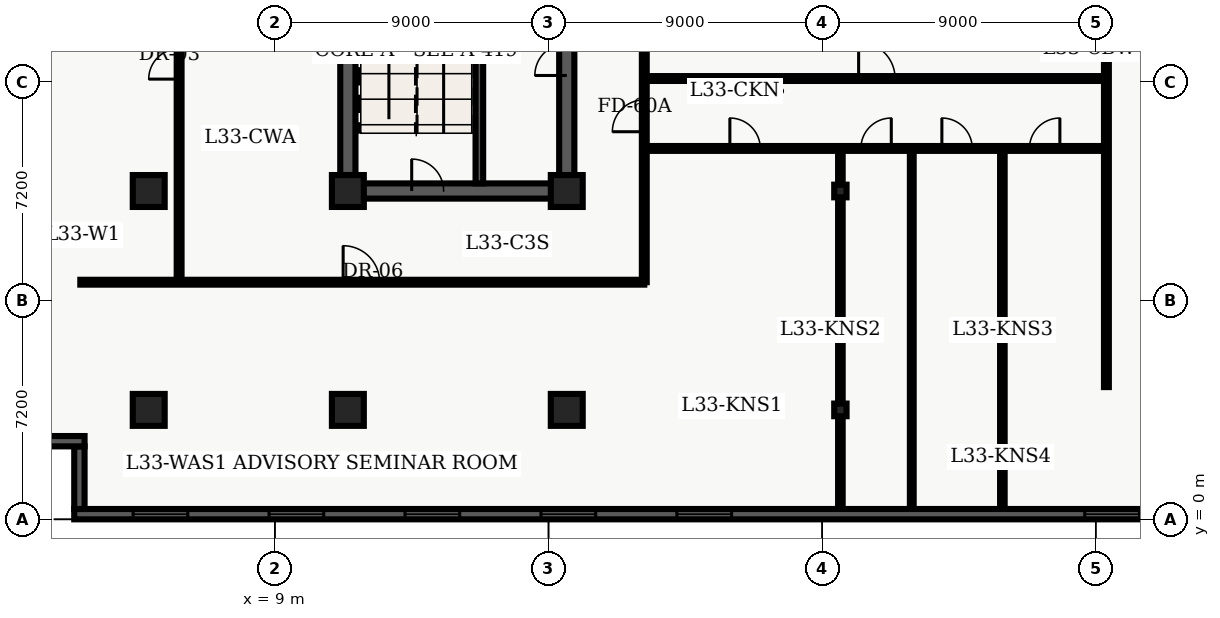
"""IFC4 building model, lengths in metres.
Left out: names, types, materials, properties, quantities, classifications, styles, units other than length and angle.
Written with IfcOpenShell. Run it as: python <this file> out.ifc"""

import sys

from ifc_helpers import new_model, entity, si_unit, converted_unit, direction, frame, origin_with_axes, origin_2d_with_axis, place, context, subcontext, project, spatial, polyline, rectangle, i_section, outline, extrude, element, fill, save


model = new_model("IFC4")
c1 = context("Model", 3, precision=1e-05, world=origin_with_axes(), true_north=direction((0.0, 1.0)))
c2 = subcontext(c1, "Body", "Model", "MODEL_VIEW")
j1 = project(units=[si_unit("LENGTHUNIT", "METRE"), converted_unit("PLANEANGLEUNIT", "DEGREE", entity("IfcPlaneAngleMeasure", 0.017), si_unit("PLANEANGLEUNIT", "RADIAN"), dimensions=[0, 0, 0, 0, 0, 0, 0])], contexts=[c1])
p1 = place(None, origin_with_axes())
s1 = spatial("IfcSite", under=j1, at=p1, CompositionType="ELEMENT")
p2 = place(p1, origin_with_axes())
s2 = spatial("IfcBuilding", under=s1, at=p2, CompositionType="ELEMENT")
p3 = place(p2, frame((0.0, 0.0, 136.8), z_axis=(0.0, 0.0, 1.0), x_axis=(1.0, 0.0, 0.0)))
s3 = spatial("IfcBuildingStorey", under=s2, at=p3, CompositionType="ELEMENT", Elevation=136.8)
p4 = place(p3, frame((11.4, 10.8, 0.0), z_axis=(0.0, 0.0, 1.0), x_axis=(0.0, 1.0, 0.0)))
e1 = element("IfcWall", 1, at=p4, inside=s3, PredefinedType="SHEAR", context=c2, shape_type="SweptSolid", body=[
    extrude(outline(polyline([(0.0, -0.25), (27.0, -0.25), (27.0, 0.25), (0.0, 0.25), (0.0, -0.25)])), origin_with_axes(), (0.0, 0.0, 1.0), 3.66),
])
p5 = place(p3, frame((11.4, 10.8, 0.0), z_axis=(0.0, 0.0, 1.0), x_axis=(1.0, 0.0, 0.0)))
e2 = element("IfcWall", 2, at=p5, inside=s3, PredefinedType="SHEAR", context=c2, shape_type="SweptSolid", body=[
    extrude(outline(polyline([(0.0, -0.25), (7.2, -0.25), (7.2, 0.25), (0.0, 0.25), (0.0, -0.25)])), origin_with_axes(), (0.0, 0.0, 1.0), 3.66),
])
p6 = place(p5, frame((2.625, 0.0, 0.0), z_axis=(0.0, 0.0, 1.0), x_axis=(1.0, 0.0, 0.0)))
e3 = element("IfcOpeningElement", 3, at=p6, cuts=e2, PredefinedType="OPENING", context=c2, shape_type="SweptSolid", body=[
    extrude(rectangle(XDim=1.05, YDim=0.52, at=origin_2d_with_axis()), origin_with_axes(), (0.0, 0.0, 1.0), 2.15),
])
p7 = place(p3, frame((18.6, 10.8, 0.0), z_axis=(0.0, 0.0, 1.0), x_axis=(0.0, 1.0, 0.0)))
e4 = element("IfcWall", 4, at=p7, inside=s3, PredefinedType="SHEAR", context=c2, shape_type="SweptSolid", body=[
    extrude(outline(polyline([(0.0, -0.25), (13.5, -0.25), (13.5, 0.25), (0.0, 0.25), (0.0, -0.25)])), origin_with_axes(), (0.0, 0.0, 1.0), 3.66),
])
p8 = place(p7, frame((11.125, 0.0, 0.0), z_axis=(0.0, 0.0, 1.0), x_axis=(1.0, 0.0, 0.0)))
e5 = element("IfcOpeningElement", 5, at=p8, cuts=e4, PredefinedType="OPENING", context=c2, shape_type="SweptSolid", body=[
    extrude(rectangle(XDim=1.05, YDim=0.52, at=origin_2d_with_axis()), origin_with_axes(), (0.0, 0.0, 1.0), 2.15),
])
p9 = place(p7, frame((4.325, 0.0, 0.0), z_axis=(0.0, 0.0, 1.0), x_axis=(1.0, 0.0, 0.0)))
e6 = element("IfcOpeningElement", 6, at=p9, cuts=e4, PredefinedType="OPENING", context=c2, shape_type="SweptSolid", body=[
    extrude(rectangle(XDim=1.05, YDim=0.52, at=origin_2d_with_axis()), origin_with_axes(), (0.0, 0.0, 1.0), 2.15),
])
p10 = place(p3, frame((15.725, 11.05, 0.0), z_axis=(0.0, 0.0, 1.0), x_axis=(0.0, 1.0, 0.0)))
e7 = element("IfcWall", 7, at=p10, inside=s3, PredefinedType="SHEAR", context=c2, shape_type="SweptSolid", body=[
    extrude(outline(polyline([(0.0, -0.125), (8.65, -0.125), (8.65, 0.125), (0.0, 0.125), (0.0, -0.125)])), origin_with_axes(), (0.0, 0.0, 1.0), 3.66),
])
for number, where, z_axis, x_axis in (
    (8, (11.4, 3.6, 0.0), (0.0, 0.0, 1.0), (1.0, 0.0, 0.0)),
    (9, (11.4, 10.8, 0.0), (0.0, 0.0, 1.0), (1.0, 0.0, 0.0)),
    (10, (18.6, 3.6, 0.0), (0.0, 0.0, 1.0), (1.0, 0.0, 0.0)),
    (11, (18.6, 10.8, 0.0), (0.0, 0.0, 1.0), (1.0, 0.0, 0.0)),
    (12, (4.85, 3.6, 0.0), (0.0, 0.0, 1.0), (1.0, 0.0, 0.0)),
    (13, (4.85, 10.8, 0.0), (0.0, 0.0, 1.0), (1.0, 0.0, 0.0)),
):
    element("IfcColumn", number, at=place(p3, frame(where, z_axis=z_axis, x_axis=x_axis)), inside=s3, PredefinedType="COLUMN", context=c2, shape_type="SweptSolid", body=[
        extrude(rectangle(XDim=1.05, YDim=1.05, at=origin_2d_with_axis()), origin_with_axes(), (0.0, 0.0, 1.0), 3.9),
    ])
for number, where, z_axis, x_axis in (
    (14, (27.6, 3.6, 0.0), (0.0, 0.0, 1.0), (1.0, 0.0, 0.0)),
    (15, (27.6, 10.8, 0.0), (0.0, 0.0, 1.0), (1.0, 0.0, 0.0)),
):
    element("IfcColumn", number, at=place(p3, frame(where, z_axis=z_axis, x_axis=x_axis)), inside=s3, PredefinedType="COLUMN", context=c2, shape_type="SweptSolid", body=[
        extrude(i_section(OverallWidth=0.406, OverallDepth=0.416, WebThickness=0.03, FlangeThickness=0.048, FilletRadius=0.022, at=origin_2d_with_axis()), origin_with_axes(), (0.0, 0.0, 1.0), 3.9),
    ])
p11 = place(p3, frame((2.6, 7.8, 0.0), z_axis=(0.0, 0.0, 1.0), x_axis=(1.0, 0.0, 0.0)))
e16 = element("IfcWall", 16, at=p11, inside=s3, PredefinedType="PARTITIONING", context=c2, shape_type="SweptSolid", body=[
    extrude(outline(polyline([(0.0, -0.08), (18.55, -0.08), (18.55, 0.08), (0.0, 0.08), (0.0, -0.08)])), origin_with_axes(), (0.0, 0.0, 1.0), 2.7),
])
p12 = place(p11, frame((9.245, 0.0, 0.0), z_axis=(0.0, 0.0, 1.0), x_axis=(1.0, 0.0, 0.0)))
e17 = element("IfcOpeningElement", 17, at=p12, cuts=e16, PredefinedType="OPENING", context=c2, shape_type="SweptSolid", body=[
    extrude(rectangle(XDim=1.2, YDim=0.18, at=origin_2d_with_axis()), origin_with_axes(), (0.0, 0.0, 1.0), 2.2),
])
p13 = place(p3, frame((21.15, 7.8, 0.0), z_axis=(0.0, 0.0, 1.0), x_axis=(0.0, 1.0, 0.0)))
e18 = element("IfcWall", 18, at=p13, inside=s3, PredefinedType="PARTITIONING", context=c2, shape_type="SweptSolid", body=[
    extrude(outline(polyline([(0.0, -0.08), (32.7, -0.08), (32.7, 0.08), (0.0, 0.08), (0.0, -0.08)])), origin_with_axes(), (0.0, 0.0, 1.0), 2.7),
])
p14 = place(p13, frame((5.475, 0.0, 0.0), z_axis=(0.0, 0.0, 1.0), x_axis=(1.0, 0.0, 0.0)))
e19 = element("IfcOpeningElement", 19, at=p14, cuts=e18, PredefinedType="OPENING", context=c2, shape_type="SweptSolid", body=[
    extrude(rectangle(XDim=1.05, YDim=0.18, at=origin_2d_with_axis()), origin_with_axes(), (0.0, 0.0, 1.0), 2.15),
])
p15 = place(p3, frame((5.85, 7.8, 0.0), z_axis=(0.0, 0.0, 1.0), x_axis=(0.0, 1.0, 0.0)))
e20 = element("IfcWall", 20, at=p15, inside=s3, PredefinedType="PARTITIONING", context=c2, shape_type="SweptSolid", body=[
    extrude(outline(polyline([(0.0, -0.08), (32.7, -0.08), (32.7, 0.08), (0.0, 0.08), (0.0, -0.08)])), origin_with_axes(), (0.0, 0.0, 1.0), 2.7),
])
p16 = place(p15, frame((7.181, 0.0, 0.0), z_axis=(0.0, 0.0, 1.0), x_axis=(1.0, 0.0, 0.0)))
e21 = element("IfcOpeningElement", 21, at=p16, cuts=e20, PredefinedType="OPENING", context=c2, shape_type="SweptSolid", body=[
    extrude(rectangle(XDim=1.0, YDim=0.18, at=origin_2d_with_axis()), origin_with_axes(), (0.0, 0.0, 1.0), 2.15),
])
p17 = place(p15, frame((23.401, 0.0, 0.0), z_axis=(0.0, 0.0, 1.0), x_axis=(1.0, 0.0, 0.0)))
e22 = element("IfcOpeningElement", 22, at=p17, cuts=e20, PredefinedType="OPENING", context=c2, shape_type="SweptSolid", body=[
    extrude(rectangle(XDim=1.0, YDim=0.18, at=origin_2d_with_axis()), origin_with_axes(), (0.0, 0.0, 1.0), 2.15),
])
p18 = place(p3, frame((21.15, 12.2, 0.0), z_axis=(0.0, 0.0, 1.0), x_axis=(1.0, 0.0, 0.0)))
e23 = element("IfcWall", 23, at=p18, inside=s3, PredefinedType="PARTITIONING", context=c2, shape_type="SweptSolid", body=[
    extrude(outline(polyline([(0.0, -0.08), (15.2, -0.08), (15.2, 0.08), (0.0, 0.08), (0.0, -0.08)])), origin_with_axes(), (0.0, 0.0, 1.0), 2.7),
])
p19 = place(p18, frame((3.315, 0.0, 0.0), z_axis=(0.0, 0.0, 1.0), x_axis=(1.0, 0.0, 0.0)))
e24 = element("IfcOpeningElement", 24, at=p19, cuts=e23, PredefinedType="OPENING", context=c2, shape_type="SweptSolid", body=[
    extrude(rectangle(XDim=1.0, YDim=0.18, at=origin_2d_with_axis()), origin_with_axes(), (0.0, 0.0, 1.0), 2.15),
])
p20 = place(p18, frame((7.624, 0.0, 0.0), z_axis=(0.0, 0.0, 1.0), x_axis=(1.0, 0.0, 0.0)))
e25 = element("IfcOpeningElement", 25, at=p20, cuts=e23, PredefinedType="OPENING", context=c2, shape_type="SweptSolid", body=[
    extrude(rectangle(XDim=1.0, YDim=0.18, at=origin_2d_with_axis()), origin_with_axes(), (0.0, 0.0, 1.0), 2.15),
])
p21 = place(p18, frame((10.288, 0.0, 0.0), z_axis=(0.0, 0.0, 1.0), x_axis=(1.0, 0.0, 0.0)))
e26 = element("IfcOpeningElement", 26, at=p21, cuts=e23, PredefinedType="OPENING", context=c2, shape_type="SweptSolid", body=[
    extrude(rectangle(XDim=1.0, YDim=0.18, at=origin_2d_with_axis()), origin_with_axes(), (0.0, 0.0, 1.0), 2.15),
])
p22 = place(p18, frame((13.169, 0.0, 0.0), z_axis=(0.0, 0.0, 1.0), x_axis=(1.0, 0.0, 0.0)))
e27 = element("IfcOpeningElement", 27, at=p22, cuts=e23, PredefinedType="OPENING", context=c2, shape_type="SweptSolid", body=[
    extrude(rectangle(XDim=1.0, YDim=0.18, at=origin_2d_with_axis()), origin_with_axes(), (0.0, 0.0, 1.0), 2.15),
])
p23 = place(p3, frame((21.15, 14.5, 0.0), z_axis=(0.0, 0.0, 1.0), x_axis=(1.0, 0.0, 0.0)))
e28 = element("IfcWall", 28, at=p23, inside=s3, PredefinedType="PARTITIONING", context=c2, shape_type="SweptSolid", body=[
    extrude(outline(polyline([(0.0, -0.08), (15.2, -0.08), (15.2, 0.08), (0.0, 0.08), (0.0, -0.08)])), origin_with_axes(), (0.0, 0.0, 1.0), 2.7),
])
p24 = place(p23, frame((7.65, 0.0, 0.0), z_axis=(0.0, 0.0, 1.0), x_axis=(1.0, 0.0, 0.0)))
e29 = element("IfcOpeningElement", 29, at=p24, cuts=e28, PredefinedType="OPENING", context=c2, shape_type="SweptSolid", body=[
    extrude(rectangle(XDim=1.2, YDim=0.18, at=origin_2d_with_axis()), origin_with_axes(), (0.0, 0.0, 1.0), 2.2),
])
p25 = place(p3, frame((36.35, 4.35, 0.0), z_axis=(0.0, 0.0, 1.0), x_axis=(0.0, 1.0, 0.0)))
e30 = element("IfcWall", 30, at=p25, inside=s3, PredefinedType="PARTITIONING", context=c2, shape_type="SweptSolid", body=[
    extrude(outline(polyline([(0.0, -0.08), (16.95, -0.08), (16.95, 0.08), (0.0, 0.08), (0.0, -0.08)])), origin_with_axes(), (0.0, 0.0, 1.0), 2.7),
])
p26 = place(p3, frame((27.6, 0.335, 0.0), z_axis=(0.0, 0.0, 1.0), x_axis=(0.0, 1.0, 0.0)))
e31 = element("IfcWall", 31, at=p26, inside=s3, PredefinedType="PARTITIONING", context=c2, shape_type="SweptSolid", body=[
    extrude(outline(polyline([(0.0, -0.075), (11.745, -0.075), (11.745, 0.075), (0.0, 0.075), (0.0, -0.075)])), origin_with_axes(), (0.0, 0.0, 1.0), 2.7),
])
p27 = place(p3, frame((29.948, 0.335, 0.0), z_axis=(0.0, 0.0, 1.0), x_axis=(0.0, 1.0, 0.0)))
e32 = element("IfcWall", 32, at=p27, inside=s3, PredefinedType="PARTITIONING", context=c2, shape_type="SweptSolid", body=[
    extrude(outline(polyline([(0.0, -0.062), (11.745, -0.062), (11.745, 0.062), (0.0, 0.062), (0.0, -0.062)])), origin_with_axes(), (0.0, 0.0, 1.0), 2.7),
])
p28 = place(p3, frame((32.928, 0.335, 0.0), z_axis=(0.0, 0.0, 1.0), x_axis=(0.0, 1.0, 0.0)))
e33 = element("IfcWall", 33, at=p28, inside=s3, PredefinedType="PARTITIONING", context=c2, shape_type="SweptSolid", body=[
    extrude(outline(polyline([(0.0, -0.075), (11.745, -0.075), (11.745, 0.075), (0.0, 0.075), (0.0, -0.075)])), origin_with_axes(), (0.0, 0.0, 1.0), 2.7),
])
p29 = place(p3, frame((57.26, 0.17, 0.0), z_axis=(0.0, 0.0, 1.0), x_axis=(-1.0, 0.0, 0.0)))
e34 = element("IfcWall", 34, at=p29, inside=s3, PredefinedType="SOLIDWALL", context=c2, shape_type="SweptSolid", body=[
    extrude(outline(polyline([(0.0, -0.17), (54.86, -0.17), (54.86, 0.17), (0.0, 0.17), (0.0, -0.17)])), origin_with_axes(), (0.0, 0.0, 1.0), 3.66),
])
p30 = place(p29, frame((2.836, 0.0, 0.45), z_axis=(0.0, 0.0, 1.0), x_axis=(1.0, 0.0, 0.0)))
e35 = element("IfcOpeningElement", 35, at=p30, cuts=e34, PredefinedType="OPENING", context=c2, shape_type="SweptSolid", body=[
    extrude(rectangle(XDim=1.8, YDim=0.36, at=origin_2d_with_axis()), origin_with_axes(), (0.0, 0.0, 1.0), 2.1),
])
p31 = place(p29, frame((7.307, 0.0, 0.45), z_axis=(0.0, 0.0, 1.0), x_axis=(1.0, 0.0, 0.0)))
e36 = element("IfcOpeningElement", 36, at=p31, cuts=e34, PredefinedType="OPENING", context=c2, shape_type="SweptSolid", body=[
    extrude(rectangle(XDim=1.8, YDim=0.36, at=origin_2d_with_axis()), origin_with_axes(), (0.0, 0.0, 1.0), 2.1),
])
p32 = place(p29, frame((11.779, 0.0, 0.45), z_axis=(0.0, 0.0, 1.0), x_axis=(1.0, 0.0, 0.0)))
e37 = element("IfcOpeningElement", 37, at=p32, cuts=e34, PredefinedType="OPENING", context=c2, shape_type="SweptSolid", body=[
    extrude(rectangle(XDim=1.8, YDim=0.36, at=origin_2d_with_axis()), origin_with_axes(), (0.0, 0.0, 1.0), 2.1),
])
p33 = place(p29, frame((16.251, 0.0, 0.45), z_axis=(0.0, 0.0, 1.0), x_axis=(1.0, 0.0, 0.0)))
e38 = element("IfcOpeningElement", 38, at=p33, cuts=e34, PredefinedType="OPENING", context=c2, shape_type="SweptSolid", body=[
    extrude(rectangle(XDim=1.8, YDim=0.36, at=origin_2d_with_axis()), origin_with_axes(), (0.0, 0.0, 1.0), 2.1),
])
p34 = place(p29, frame((20.723, 0.0, 0.45), z_axis=(0.0, 0.0, 1.0), x_axis=(1.0, 0.0, 0.0)))
e39 = element("IfcOpeningElement", 39, at=p34, cuts=e34, PredefinedType="OPENING", context=c2, shape_type="SweptSolid", body=[
    extrude(rectangle(XDim=1.8, YDim=0.36, at=origin_2d_with_axis()), origin_with_axes(), (0.0, 0.0, 1.0), 2.1),
])
p35 = place(p29, frame((34.138, 0.0, 0.45), z_axis=(0.0, 0.0, 1.0), x_axis=(1.0, 0.0, 0.0)))
e40 = element("IfcOpeningElement", 40, at=p35, cuts=e34, PredefinedType="OPENING", context=c2, shape_type="SweptSolid", body=[
    extrude(rectangle(XDim=1.8, YDim=0.36, at=origin_2d_with_axis()), origin_with_axes(), (0.0, 0.0, 1.0), 2.1),
])
p36 = place(p29, frame((38.609, 0.0, 0.45), z_axis=(0.0, 0.0, 1.0), x_axis=(1.0, 0.0, 0.0)))
e41 = element("IfcOpeningElement", 41, at=p36, cuts=e34, PredefinedType="OPENING", context=c2, shape_type="SweptSolid", body=[
    extrude(rectangle(XDim=1.8, YDim=0.36, at=origin_2d_with_axis()), origin_with_axes(), (0.0, 0.0, 1.0), 2.1),
])
p37 = place(p29, frame((43.081, 0.0, 0.45), z_axis=(0.0, 0.0, 1.0), x_axis=(1.0, 0.0, 0.0)))
e42 = element("IfcOpeningElement", 42, at=p37, cuts=e34, PredefinedType="OPENING", context=c2, shape_type="SweptSolid", body=[
    extrude(rectangle(XDim=1.8, YDim=0.36, at=origin_2d_with_axis()), origin_with_axes(), (0.0, 0.0, 1.0), 2.1),
])
p38 = place(p29, frame((47.553, 0.0, 0.45), z_axis=(0.0, 0.0, 1.0), x_axis=(1.0, 0.0, 0.0)))
e43 = element("IfcOpeningElement", 43, at=p38, cuts=e34, PredefinedType="OPENING", context=c2, shape_type="SweptSolid", body=[
    extrude(rectangle(XDim=1.8, YDim=0.36, at=origin_2d_with_axis()), origin_with_axes(), (0.0, 0.0, 1.0), 2.1),
])
p39 = place(p29, frame((52.024, 0.0, 0.45), z_axis=(0.0, 0.0, 1.0), x_axis=(1.0, 0.0, 0.0)))
e44 = element("IfcOpeningElement", 44, at=p39, cuts=e34, PredefinedType="OPENING", context=c2, shape_type="SweptSolid", body=[
    extrude(rectangle(XDim=1.8, YDim=0.36, at=origin_2d_with_axis()), origin_with_axes(), (0.0, 0.0, 1.0), 2.1),
])
p40 = place(p3, frame((2.57, 0.34, 0.0), z_axis=(0.0, 0.0, 1.0), x_axis=(0.0, 1.0, 0.0)))
e45 = element("IfcWall", 45, at=p40, inside=s3, PredefinedType="SOLIDWALL", context=c2, shape_type="SweptSolid", body=[
    extrude(outline(polyline([(0.0, -0.17), (2.06, -0.17), (2.06, 0.17), (0.0, 0.17), (0.0, -0.17)])), origin_with_axes(), (0.0, 0.0, 1.0), 3.66),
])
p41 = place(p3, frame((2.74, 2.57, 0.0), z_axis=(0.0, 0.0, 1.0), x_axis=(-1.0, 0.0, 0.0)))
e46 = element("IfcWall", 46, at=p41, inside=s3, PredefinedType="SOLIDWALL", context=c2, shape_type="SweptSolid", body=[
    extrude(outline(polyline([(0.0, -0.17), (2.74, -0.17), (2.74, 0.17), (0.0, 0.17), (0.0, -0.17)])), origin_with_axes(), (0.0, 0.0, 1.0), 3.66),
])
p42 = place(p5, frame((2.625, 0.0, 0.0), z_axis=(0.0, 0.0, 1.0), x_axis=(1.0, 0.0, 0.0)))
e47 = element("IfcDoor", 47, at=p42, inside=s3, OperationType="SINGLE_SWING_LEFT", PredefinedType="DOOR", context=c2, shape_type="SweptSolid", body=[
    extrude(rectangle(XDim=1.05, YDim=0.09, at=origin_2d_with_axis()), origin_with_axes(), (0.0, 0.0, 1.0), 2.15),
])
fill(e3, e47)
p43 = place(p7, frame((4.325, 0.0, 0.0), z_axis=(0.0, 0.0, 1.0), x_axis=(1.0, 0.0, 0.0)))
e48 = element("IfcDoor", 48, at=p43, inside=s3, OperationType="SINGLE_SWING_LEFT", PredefinedType="DOOR", context=c2, shape_type="SweptSolid", body=[
    extrude(rectangle(XDim=1.05, YDim=0.09, at=origin_2d_with_axis()), origin_with_axes(), (0.0, 0.0, 1.0), 2.15),
])
fill(e6, e48)
p44 = place(p15, frame((7.181, 0.0, 0.0), z_axis=(0.0, 0.0, 1.0), x_axis=(1.0, 0.0, 0.0)))
e49 = element("IfcDoor", 49, at=p44, inside=s3, OperationType="SINGLE_SWING_LEFT", PredefinedType="DOOR", context=c2, shape_type="SweptSolid", body=[
    extrude(rectangle(XDim=1.0, YDim=0.09, at=origin_2d_with_axis()), origin_with_axes(), (0.0, 0.0, 1.0), 2.15),
])
fill(e21, e49)
p45 = place(p11, frame((9.245, 0.0, 0.0), z_axis=(0.0, 0.0, 1.0), x_axis=(1.0, 0.0, 0.0)))
e50 = element("IfcDoor", 50, at=p45, inside=s3, OperationType="SINGLE_SWING_LEFT", PredefinedType="DOOR", context=c2, shape_type="SweptSolid", body=[
    extrude(rectangle(XDim=1.2, YDim=0.09, at=origin_2d_with_axis()), origin_with_axes(), (0.0, 0.0, 1.0), 2.2),
])
fill(e17, e50)
p46 = place(p13, frame((5.475, 0.0, 0.0), z_axis=(0.0, 0.0, 1.0), x_axis=(1.0, 0.0, 0.0)))
e51 = element("IfcDoor", 51, at=p46, inside=s3, OperationType="SINGLE_SWING_LEFT", PredefinedType="DOOR", context=c2, shape_type="SweptSolid", body=[
    extrude(rectangle(XDim=1.05, YDim=0.09, at=origin_2d_with_axis()), origin_with_axes(), (0.0, 0.0, 1.0), 2.15),
])
fill(e19, e51)
p47 = place(p18, frame((3.315, 0.0, 0.0), z_axis=(0.0, 0.0, 1.0), x_axis=(1.0, 0.0, 0.0)))
e52 = element("IfcDoor", 52, at=p47, inside=s3, OperationType="SINGLE_SWING_LEFT", PredefinedType="DOOR", context=c2, shape_type="SweptSolid", body=[
    extrude(rectangle(XDim=1.0, YDim=0.09, at=origin_2d_with_axis()), origin_with_axes(), (0.0, 0.0, 1.0), 2.15),
])
fill(e24, e52)
p48 = place(p18, frame((7.624, 0.0, 0.0), z_axis=(0.0, 0.0, 1.0), x_axis=(1.0, 0.0, 0.0)))
e53 = element("IfcDoor", 53, at=p48, inside=s3, OperationType="SINGLE_SWING_RIGHT", PredefinedType="DOOR", context=c2, shape_type="SweptSolid", body=[
    extrude(rectangle(XDim=1.0, YDim=0.09, at=origin_2d_with_axis()), origin_with_axes(), (0.0, 0.0, 1.0), 2.15),
])
fill(e25, e53)
p49 = place(p18, frame((10.288, 0.0, 0.0), z_axis=(0.0, 0.0, 1.0), x_axis=(1.0, 0.0, 0.0)))
e54 = element("IfcDoor", 54, at=p49, inside=s3, OperationType="SINGLE_SWING_LEFT", PredefinedType="DOOR", context=c2, shape_type="SweptSolid", body=[
    extrude(rectangle(XDim=1.0, YDim=0.09, at=origin_2d_with_axis()), origin_with_axes(), (0.0, 0.0, 1.0), 2.15),
])
fill(e26, e54)
p50 = place(p18, frame((13.169, 0.0, 0.0), z_axis=(0.0, 0.0, 1.0), x_axis=(1.0, 0.0, 0.0)))
e55 = element("IfcDoor", 55, at=p50, inside=s3, OperationType="SINGLE_SWING_RIGHT", PredefinedType="DOOR", context=c2, shape_type="SweptSolid", body=[
    extrude(rectangle(XDim=1.0, YDim=0.09, at=origin_2d_with_axis()), origin_with_axes(), (0.0, 0.0, 1.0), 2.15),
])
fill(e27, e55)
p51 = place(p23, frame((7.65, 0.0, 0.0), z_axis=(0.0, 0.0, 1.0), x_axis=(1.0, 0.0, 0.0)))
e56 = element("IfcDoor", 56, at=p51, inside=s3, OperationType="SINGLE_SWING_LEFT", PredefinedType="DOOR", context=c2, shape_type="SweptSolid", body=[
    extrude(rectangle(XDim=1.2, YDim=0.09, at=origin_2d_with_axis()), origin_with_axes(), (0.0, 0.0, 1.0), 2.2),
])
fill(e29, e56)
p52 = place(p29, frame((20.723, 0.0, 0.45), z_axis=(0.0, 0.0, 1.0), x_axis=(1.0, 0.0, 0.0)))
e57 = element("IfcWindow", 57, at=p52, inside=s3, PredefinedType="WINDOW", context=c2, shape_type="SweptSolid", body=[
    extrude(rectangle(XDim=1.8, YDim=0.09, at=origin_2d_with_axis()), origin_with_axes(), (0.0, 0.0, 1.0), 2.1),
])
fill(e39, e57)
p53 = place(p29, frame((34.138, 0.0, 0.45), z_axis=(0.0, 0.0, 1.0), x_axis=(1.0, 0.0, 0.0)))
e58 = element("IfcWindow", 58, at=p53, inside=s3, PredefinedType="WINDOW", context=c2, shape_type="SweptSolid", body=[
    extrude(rectangle(XDim=1.8, YDim=0.09, at=origin_2d_with_axis()), origin_with_axes(), (0.0, 0.0, 1.0), 2.1),
])
fill(e40, e58)
p54 = place(p29, frame((38.609, 0.0, 0.45), z_axis=(0.0, 0.0, 1.0), x_axis=(1.0, 0.0, 0.0)))
e59 = element("IfcWindow", 59, at=p54, inside=s3, PredefinedType="WINDOW", context=c2, shape_type="SweptSolid", body=[
    extrude(rectangle(XDim=1.8, YDim=0.09, at=origin_2d_with_axis()), origin_with_axes(), (0.0, 0.0, 1.0), 2.1),
])
fill(e41, e59)
p55 = place(p29, frame((43.081, 0.0, 0.45), z_axis=(0.0, 0.0, 1.0), x_axis=(1.0, 0.0, 0.0)))
e60 = element("IfcWindow", 60, at=p55, inside=s3, PredefinedType="WINDOW", context=c2, shape_type="SweptSolid", body=[
    extrude(rectangle(XDim=1.8, YDim=0.09, at=origin_2d_with_axis()), origin_with_axes(), (0.0, 0.0, 1.0), 2.1),
])
fill(e42, e60)
p56 = place(p29, frame((47.553, 0.0, 0.45), z_axis=(0.0, 0.0, 1.0), x_axis=(1.0, 0.0, 0.0)))
e61 = element("IfcWindow", 61, at=p56, inside=s3, PredefinedType="WINDOW", context=c2, shape_type="SweptSolid", body=[
    extrude(rectangle(XDim=1.8, YDim=0.09, at=origin_2d_with_axis()), origin_with_axes(), (0.0, 0.0, 1.0), 2.1),
])
fill(e43, e61)
p57 = place(p29, frame((52.024, 0.0, 0.45), z_axis=(0.0, 0.0, 1.0), x_axis=(1.0, 0.0, 0.0)))
e62 = element("IfcWindow", 62, at=p57, inside=s3, PredefinedType="WINDOW", context=c2, shape_type="SweptSolid", body=[
    extrude(rectangle(XDim=1.8, YDim=0.09, at=origin_2d_with_axis()), origin_with_axes(), (0.0, 0.0, 1.0), 2.1),
])
fill(e44, e62)
save(model, sys.argv[1])
